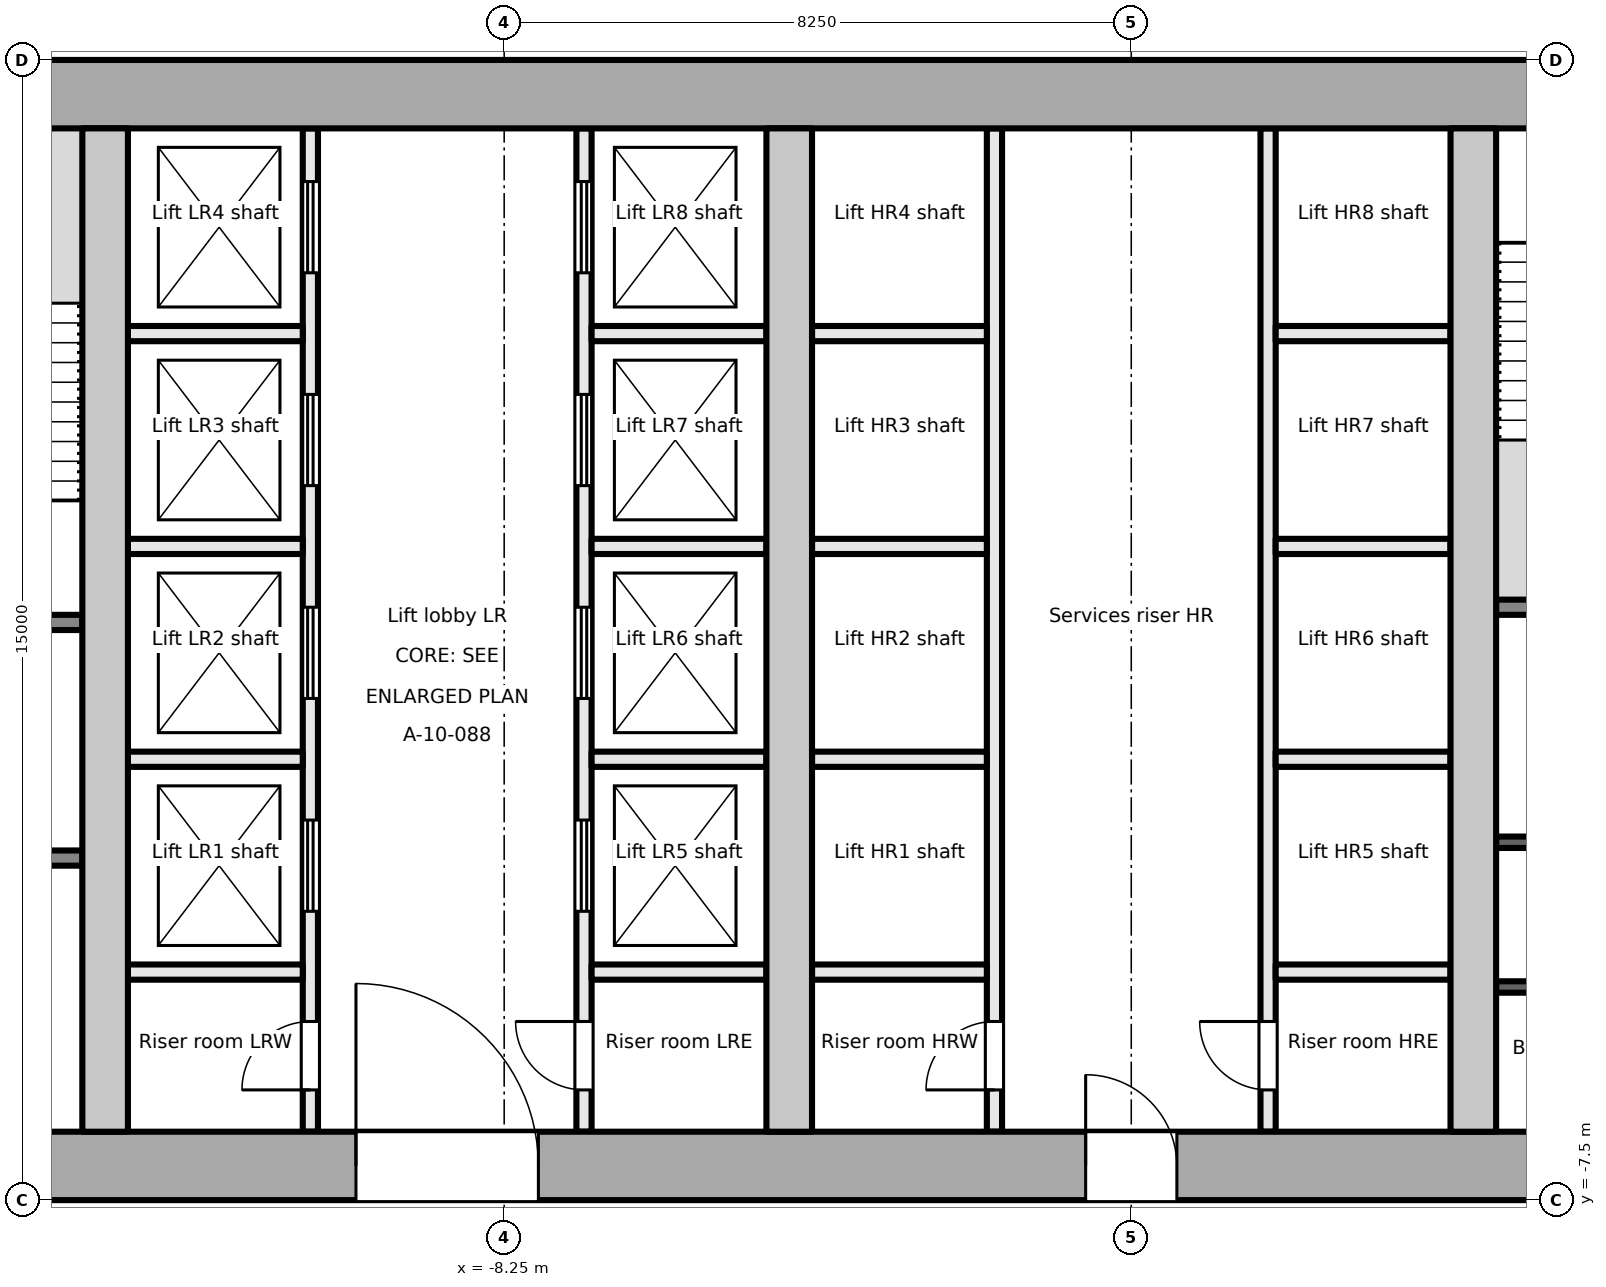
"""IFC4 building model, lengths in metres.
Left out: names, types, materials, properties, quantities, classifications, styles, units other than length and angle.
Written with IfcOpenShell. Run it as: python <this file> out.ifc"""

import sys

from ifc_helpers import new_model, si_unit, direction, frame, frame_2d, origin, place, context, subcontext, project, spatial, rectangle, extrude, element, fill, save


model = new_model("IFC4")
c1 = context("Model", 3, precision=1e-05, world=origin(), true_north=direction((0.0, 1.0)))
c2 = subcontext(c1, "Body", "Model", "MODEL_VIEW")
j1 = project(units=[si_unit("LENGTHUNIT", "METRE"), si_unit("PLANEANGLEUNIT", "RADIAN")], contexts=[c1])
p1 = place(None, origin())
s1 = spatial("IfcSite", under=j1, at=p1, CompositionType="ELEMENT")
p2 = place(p1, origin())
s2 = spatial("IfcBuilding", under=s1, at=p2, CompositionType="ELEMENT")
p3 = place(p2, frame((0.0, 0.0, 44.7)))
s3 = spatial("IfcBuildingStorey", under=s2, at=p3, CompositionType="ELEMENT", Elevation=44.7)
p4 = place(p3, frame((-18.0, -7.05, -0.2), z_axis=(0.0, 0.0, 1.0), x_axis=(1.0, 0.0, 0.0)))
e1 = element("IfcWall", 1, at=p4, inside=s3, PredefinedType="SHEAR", context=c2, shape_type="SweptSolid", body=[
    extrude(rectangle(XDim=36.0, YDim=0.9, at=frame_2d((18.0, 0.0))), origin(), (0.0, 0.0, 1.0), 4.1),
])
p5 = place(p4, frame((7.8, 0.0, 0.2)))
e2 = element("IfcOpeningElement", 2, at=p5, cuts=e1, PredefinedType="OPENING", context=c2, shape_type="SweptSolid", body=[
    extrude(rectangle(XDim=2.4, YDim=2.1, at=frame_2d((1.2, 1.05))), frame((0.0, 0.46, 0.0), z_axis=(0.0, -1.0, 0.0), x_axis=(1.0, 0.0, 0.0)), (0.0, 0.0, 1.0), 0.921),
])
p6 = place(p4, frame((17.4, 0.0, 0.2)))
e3 = element("IfcOpeningElement", 3, at=p6, cuts=e1, PredefinedType="OPENING", context=c2, shape_type="SweptSolid", body=[
    extrude(rectangle(XDim=1.2, YDim=2.1, at=frame_2d((0.6, 1.05))), frame((0.0, 0.46, 0.0), z_axis=(0.0, -1.0, 0.0), x_axis=(1.0, 0.0, 0.0)), (0.0, 0.0, 1.0), 0.921),
])
p7 = place(p4, frame((26.1, 0.0, 0.2)))
e4 = element("IfcOpeningElement", 4, at=p7, cuts=e1, PredefinedType="OPENING", context=c2, shape_type="SweptSolid", body=[
    extrude(rectangle(XDim=2.4, YDim=2.1, at=frame_2d((1.2, 1.05))), frame((0.0, 0.46, 0.0), z_axis=(0.0, -1.0, 0.0), x_axis=(1.0, 0.0, 0.0)), (0.0, 0.0, 1.0), 0.921),
])
p8 = place(p3, frame((-18.0, 7.05, -0.2), z_axis=(0.0, 0.0, 1.0), x_axis=(1.0, 0.0, 0.0)))
e5 = element("IfcWall", 5, at=p8, inside=s3, PredefinedType="SHEAR", context=c2, shape_type="SweptSolid", body=[
    extrude(rectangle(XDim=36.0, YDim=0.9, at=frame_2d((18.0, 0.0))), origin(), (0.0, 0.0, 1.0), 4.1),
])
for number, where, z_axis, x_axis in (
    (6, (-13.5, -6.6, -0.2), (0.0, 0.0, 1.0), (0.0, 1.0, 0.0)),
    (7, (-4.5, -6.6, -0.2), (0.0, 0.0, 1.0), (0.0, 1.0, 0.0)),
    (8, (4.5, -6.6, -0.2), (0.0, 0.0, 1.0), (0.0, 1.0, 0.0)),
):
    element("IfcWall", number, at=place(p3, frame(where, z_axis=z_axis, x_axis=x_axis)), inside=s3, PredefinedType="SHEAR", context=c2, shape_type="SweptSolid", body=[
        extrude(rectangle(XDim=13.2, YDim=0.6, at=frame_2d((6.6, 0.0))), origin(), (0.0, 0.0, 1.0), 4.1),
    ])
p9 = place(p3, frame((-17.1, -3.0, 0.0), z_axis=(0.0, 0.0, 1.0), x_axis=(1.0, 0.0, 0.0)))
e9 = element("IfcWall", 9, at=p9, inside=s3, PredefinedType="PARTITIONING", context=c2, shape_type="SweptSolid", body=[
    extrude(rectangle(XDim=3.3, YDim=0.2, at=frame_2d((1.65, 0.0))), origin(), (0.0, 0.0, 1.0), 3.9),
])
p10 = place(p9, frame((1.1, 0.0, 0.0)))
e10 = element("IfcOpeningElement", 10, at=p10, cuts=e9, PredefinedType="OPENING", context=c2, shape_type="SweptSolid", body=[
    extrude(rectangle(XDim=1.1, YDim=2.1, at=frame_2d((0.55, 1.05))), frame((0.0, 0.111, 0.0), z_axis=(0.0, -1.0, 0.0), x_axis=(1.0, 0.0, 0.0)), (0.0, 0.0, 1.0), 0.221),
])
p11 = place(p3, frame((-17.1, 0.1, 0.0), z_axis=(0.0, 0.0, 1.0), x_axis=(1.0, 0.0, 0.0)))
e11 = element("IfcWall", 11, at=p11, inside=s3, PredefinedType="PARTITIONING", context=c2, shape_type="SweptSolid", body=[
    extrude(rectangle(XDim=3.3, YDim=0.2, at=frame_2d((1.65, 0.0))), origin(), (0.0, 0.0, 1.0), 3.9),
])
p12 = place(p11, frame((1.1, 0.0, 0.0)))
e12 = element("IfcOpeningElement", 12, at=p12, cuts=e11, PredefinedType="OPENING", context=c2, shape_type="SweptSolid", body=[
    extrude(rectangle(XDim=1.1, YDim=2.1, at=frame_2d((0.55, 1.05))), frame((0.0, 0.111, 0.0), z_axis=(0.0, -1.0, 0.0), x_axis=(1.0, 0.0, 0.0)), (0.0, 0.0, 1.0), 0.221),
])
p13 = place(p3, frame((-10.8, -6.6, 0.0), z_axis=(0.0, 0.0, 1.0), x_axis=(0.0, 1.0, 0.0)))
e13 = element("IfcWall", 13, at=p13, inside=s3, PredefinedType="PARTITIONING", context=c2, shape_type="SweptSolid", body=[
    extrude(rectangle(XDim=13.2, YDim=0.2, at=frame_2d((6.6, 0.0))), origin(), (0.0, 0.0, 1.0), 3.9),
])
p14 = place(p13, frame((0.55, 0.0, 0.0)))
e14 = element("IfcOpeningElement", 14, at=p14, cuts=e13, PredefinedType="OPENING", context=c2, shape_type="SweptSolid", body=[
    extrude(rectangle(XDim=0.9, YDim=2.1, at=frame_2d((0.45, 1.05))), frame((0.0, 0.111, 0.0), z_axis=(0.0, -1.0, 0.0), x_axis=(1.0, 0.0, 0.0)), (0.0, 0.0, 1.0), 0.221),
])
p15 = place(p13, frame((2.9, 0.0, 0.0)))
e15 = element("IfcOpeningElement", 15, at=p15, cuts=e13, PredefinedType="OPENING", context=c2, shape_type="SweptSolid", body=[
    extrude(rectangle(XDim=1.2, YDim=2.1, at=frame_2d((0.6, 1.05))), frame((0.0, 0.111, 0.0), z_axis=(0.0, -1.0, 0.0), x_axis=(1.0, 0.0, 0.0)), (0.0, 0.0, 1.0), 0.221),
])
p16 = place(p13, frame((5.7, 0.0, 0.0)))
e16 = element("IfcOpeningElement", 16, at=p16, cuts=e13, PredefinedType="OPENING", context=c2, shape_type="SweptSolid", body=[
    extrude(rectangle(XDim=1.2, YDim=2.1, at=frame_2d((0.6, 1.05))), frame((0.0, 0.111, 0.0), z_axis=(0.0, -1.0, 0.0), x_axis=(1.0, 0.0, 0.0)), (0.0, 0.0, 1.0), 0.221),
])
p17 = place(p13, frame((8.5, 0.0, 0.0)))
e17 = element("IfcOpeningElement", 17, at=p17, cuts=e13, PredefinedType="OPENING", context=c2, shape_type="SweptSolid", body=[
    extrude(rectangle(XDim=1.2, YDim=2.1, at=frame_2d((0.6, 1.05))), frame((0.0, 0.111, 0.0), z_axis=(0.0, -1.0, 0.0), x_axis=(1.0, 0.0, 0.0)), (0.0, 0.0, 1.0), 0.221),
])
p18 = place(p13, frame((11.3, 0.0, 0.0)))
e18 = element("IfcOpeningElement", 18, at=p18, cuts=e13, PredefinedType="OPENING", context=c2, shape_type="SweptSolid", body=[
    extrude(rectangle(XDim=1.2, YDim=2.1, at=frame_2d((0.6, 1.05))), frame((0.0, 0.111, 0.0), z_axis=(0.0, -1.0, 0.0), x_axis=(1.0, 0.0, 0.0)), (0.0, 0.0, 1.0), 0.221),
])
p19 = place(p3, frame((-7.2, -6.6, 0.0), z_axis=(0.0, 0.0, 1.0), x_axis=(0.0, 1.0, 0.0)))
e19 = element("IfcWall", 19, at=p19, inside=s3, PredefinedType="PARTITIONING", context=c2, shape_type="SweptSolid", body=[
    extrude(rectangle(XDim=13.2, YDim=0.2, at=frame_2d((6.6, 0.0))), origin(), (0.0, 0.0, 1.0), 3.9),
])
p20 = place(p19, frame((0.55, 0.0, 0.0)))
e20 = element("IfcOpeningElement", 20, at=p20, cuts=e19, PredefinedType="OPENING", context=c2, shape_type="SweptSolid", body=[
    extrude(rectangle(XDim=0.9, YDim=2.1, at=frame_2d((0.45, 1.05))), frame((0.0, 0.111, 0.0), z_axis=(0.0, -1.0, 0.0), x_axis=(1.0, 0.0, 0.0)), (0.0, 0.0, 1.0), 0.221),
])
p21 = place(p19, frame((2.9, 0.0, 0.0)))
e21 = element("IfcOpeningElement", 21, at=p21, cuts=e19, PredefinedType="OPENING", context=c2, shape_type="SweptSolid", body=[
    extrude(rectangle(XDim=1.2, YDim=2.1, at=frame_2d((0.6, 1.05))), frame((0.0, 0.111, 0.0), z_axis=(0.0, -1.0, 0.0), x_axis=(1.0, 0.0, 0.0)), (0.0, 0.0, 1.0), 0.221),
])
p22 = place(p19, frame((5.7, 0.0, 0.0)))
e22 = element("IfcOpeningElement", 22, at=p22, cuts=e19, PredefinedType="OPENING", context=c2, shape_type="SweptSolid", body=[
    extrude(rectangle(XDim=1.2, YDim=2.1, at=frame_2d((0.6, 1.05))), frame((0.0, 0.111, 0.0), z_axis=(0.0, -1.0, 0.0), x_axis=(1.0, 0.0, 0.0)), (0.0, 0.0, 1.0), 0.221),
])
p23 = place(p19, frame((8.5, 0.0, 0.0)))
e23 = element("IfcOpeningElement", 23, at=p23, cuts=e19, PredefinedType="OPENING", context=c2, shape_type="SweptSolid", body=[
    extrude(rectangle(XDim=1.2, YDim=2.1, at=frame_2d((0.6, 1.05))), frame((0.0, 0.111, 0.0), z_axis=(0.0, -1.0, 0.0), x_axis=(1.0, 0.0, 0.0)), (0.0, 0.0, 1.0), 0.221),
])
p24 = place(p19, frame((11.3, 0.0, 0.0)))
e24 = element("IfcOpeningElement", 24, at=p24, cuts=e19, PredefinedType="OPENING", context=c2, shape_type="SweptSolid", body=[
    extrude(rectangle(XDim=1.2, YDim=2.1, at=frame_2d((0.6, 1.05))), frame((0.0, 0.111, 0.0), z_axis=(0.0, -1.0, 0.0), x_axis=(1.0, 0.0, 0.0)), (0.0, 0.0, 1.0), 0.221),
])
for number, where, z_axis, x_axis in (
    (25, (-13.2, -1.7, 0.0), (0.0, 0.0, 1.0), (1.0, 0.0, 0.0)),
    (26, (-13.2, 1.1, 0.0), (0.0, 0.0, 1.0), (1.0, 0.0, 0.0)),
    (27, (-13.2, 3.9, 0.0), (0.0, 0.0, 1.0), (1.0, 0.0, 0.0)),
    (28, (-13.2, -4.5, 0.0), (0.0, 0.0, 1.0), (1.0, 0.0, 0.0)),
    (29, (-7.1, -1.7, 0.0), (0.0, 0.0, 1.0), (1.0, 0.0, 0.0)),
    (30, (-7.1, 1.1, 0.0), (0.0, 0.0, 1.0), (1.0, 0.0, 0.0)),
    (31, (-7.1, 3.9, 0.0), (0.0, 0.0, 1.0), (1.0, 0.0, 0.0)),
    (32, (-7.1, -4.5, 0.0), (0.0, 0.0, 1.0), (1.0, 0.0, 0.0)),
):
    element("IfcWall", number, at=place(p3, frame(where, z_axis=z_axis, x_axis=x_axis)), inside=s3, PredefinedType="PARTITIONING", context=c2, shape_type="SweptSolid", body=[
        extrude(rectangle(XDim=2.3, YDim=0.2, at=frame_2d((1.15, 0.0))), origin(), (0.0, 0.0, 1.0), 3.9),
    ])
p25 = place(p3, frame((-1.8, -6.6, 0.0), z_axis=(0.0, 0.0, 1.0), x_axis=(0.0, 1.0, 0.0)))
e33 = element("IfcWall", 33, at=p25, inside=s3, PredefinedType="PARTITIONING", context=c2, shape_type="SweptSolid", body=[
    extrude(rectangle(XDim=13.2, YDim=0.2, at=frame_2d((6.6, 0.0))), origin(), (0.0, 0.0, 1.0), 3.9),
])
p26 = place(p25, frame((0.55, 0.0, 0.0)))
e34 = element("IfcOpeningElement", 34, at=p26, cuts=e33, PredefinedType="OPENING", context=c2, shape_type="SweptSolid", body=[
    extrude(rectangle(XDim=0.9, YDim=2.1, at=frame_2d((0.45, 1.05))), frame((0.0, 0.111, 0.0), z_axis=(0.0, -1.0, 0.0), x_axis=(1.0, 0.0, 0.0)), (0.0, 0.0, 1.0), 0.221),
])
p27 = place(p3, frame((1.8, -6.6, 0.0), z_axis=(0.0, 0.0, 1.0), x_axis=(0.0, 1.0, 0.0)))
e35 = element("IfcWall", 35, at=p27, inside=s3, PredefinedType="PARTITIONING", context=c2, shape_type="SweptSolid", body=[
    extrude(rectangle(XDim=13.2, YDim=0.2, at=frame_2d((6.6, 0.0))), origin(), (0.0, 0.0, 1.0), 3.9),
])
p28 = place(p27, frame((0.55, 0.0, 0.0)))
e36 = element("IfcOpeningElement", 36, at=p28, cuts=e35, PredefinedType="OPENING", context=c2, shape_type="SweptSolid", body=[
    extrude(rectangle(XDim=0.9, YDim=2.1, at=frame_2d((0.45, 1.05))), frame((0.0, 0.111, 0.0), z_axis=(0.0, -1.0, 0.0), x_axis=(1.0, 0.0, 0.0)), (0.0, 0.0, 1.0), 0.221),
])
for number, where, z_axis, x_axis in (
    (37, (-4.2, -1.7, 0.0), (0.0, 0.0, 1.0), (1.0, 0.0, 0.0)),
    (38, (-4.2, 1.1, 0.0), (0.0, 0.0, 1.0), (1.0, 0.0, 0.0)),
    (39, (-4.2, 3.9, 0.0), (0.0, 0.0, 1.0), (1.0, 0.0, 0.0)),
    (40, (-4.2, -4.5, 0.0), (0.0, 0.0, 1.0), (1.0, 0.0, 0.0)),
    (41, (1.9, -1.7, 0.0), (0.0, 0.0, 1.0), (1.0, 0.0, 0.0)),
    (42, (1.9, 1.1, 0.0), (0.0, 0.0, 1.0), (1.0, 0.0, 0.0)),
    (43, (1.9, 3.9, 0.0), (0.0, 0.0, 1.0), (1.0, 0.0, 0.0)),
    (44, (1.9, -4.5, 0.0), (0.0, 0.0, 1.0), (1.0, 0.0, 0.0)),
):
    element("IfcWall", number, at=place(p3, frame(where, z_axis=z_axis, x_axis=x_axis)), inside=s3, PredefinedType="PARTITIONING", context=c2, shape_type="SweptSolid", body=[
        extrude(rectangle(XDim=2.3, YDim=0.2, at=frame_2d((1.15, 0.0))), origin(), (0.0, 0.0, 1.0), 3.9),
    ])
p29 = place(p3, frame((4.8, 0.3, 0.0), z_axis=(0.0, 0.0, 1.0), x_axis=(1.0, 0.0, 0.0)))
e45 = element("IfcWall", 45, at=p29, inside=s3, PredefinedType="PARTITIONING", context=c2, shape_type="SweptSolid", body=[
    extrude(rectangle(XDim=3.15, YDim=0.2, at=frame_2d((1.575, 0.0))), origin(), (0.0, 0.0, 1.0), 3.9),
])
for number, where, z_axis, x_axis in (
    (46, (4.8, -4.696, 0.0), (0.0, 0.0, 1.0), (1.0, 0.0, 0.0)),
    (47, (4.8, -2.792, 0.0), (0.0, 0.0, 1.0), (1.0, 0.0, 0.0)),
):
    element("IfcWall", number, at=place(p3, frame(where, z_axis=z_axis, x_axis=x_axis)), inside=s3, PredefinedType="PARTITIONING", context=c2, shape_type="SweptSolid", body=[
        extrude(rectangle(XDim=3.15, YDim=0.15, at=frame_2d((1.575, 0.0))), origin(), (0.0, 0.0, 1.0), 3.9),
    ])
p30 = place(p14, origin())
e48 = element("IfcDoor", 48, at=p30, inside=s3, OperationType="SINGLE_SWING_LEFT", PredefinedType="DOOR", context=c2, shape_type="SweptSolid", body=[
    extrude(rectangle(XDim=0.9, YDim=2.1, at=frame_2d((0.45, 1.05))), frame((0.0, 0.025, 0.0), z_axis=(0.0, -1.0, 0.0), x_axis=(1.0, 0.0, 0.0)), (0.0, 0.0, 1.0), 0.05),
])
fill(e14, e48)
p31 = place(p15, origin())
e49 = element("IfcDoor", 49, at=p31, inside=s3, OperationType="DOUBLE_DOOR_SLIDING", PredefinedType="DOOR", context=c2, shape_type="SweptSolid", body=[
    extrude(rectangle(XDim=1.2, YDim=2.1, at=frame_2d((0.6, 1.05))), frame((0.0, 0.025, 0.0), z_axis=(0.0, -1.0, 0.0), x_axis=(1.0, 0.0, 0.0)), (0.0, 0.0, 1.0), 0.05),
])
fill(e15, e49)
p32 = place(p16, origin())
e50 = element("IfcDoor", 50, at=p32, inside=s3, OperationType="DOUBLE_DOOR_SLIDING", PredefinedType="DOOR", context=c2, shape_type="SweptSolid", body=[
    extrude(rectangle(XDim=1.2, YDim=2.1, at=frame_2d((0.6, 1.05))), frame((0.0, 0.025, 0.0), z_axis=(0.0, -1.0, 0.0), x_axis=(1.0, 0.0, 0.0)), (0.0, 0.0, 1.0), 0.05),
])
fill(e16, e50)
p33 = place(p17, origin())
e51 = element("IfcDoor", 51, at=p33, inside=s3, OperationType="DOUBLE_DOOR_SLIDING", PredefinedType="DOOR", context=c2, shape_type="SweptSolid", body=[
    extrude(rectangle(XDim=1.2, YDim=2.1, at=frame_2d((0.6, 1.05))), frame((0.0, 0.025, 0.0), z_axis=(0.0, -1.0, 0.0), x_axis=(1.0, 0.0, 0.0)), (0.0, 0.0, 1.0), 0.05),
])
fill(e17, e51)
p34 = place(p18, origin())
e52 = element("IfcDoor", 52, at=p34, inside=s3, OperationType="DOUBLE_DOOR_SLIDING", PredefinedType="DOOR", context=c2, shape_type="SweptSolid", body=[
    extrude(rectangle(XDim=1.2, YDim=2.1, at=frame_2d((0.6, 1.05))), frame((0.0, 0.025, 0.0), z_axis=(0.0, -1.0, 0.0), x_axis=(1.0, 0.0, 0.0)), (0.0, 0.0, 1.0), 0.05),
])
fill(e18, e52)
p35 = place(p20, origin())
e53 = element("IfcDoor", 53, at=p35, inside=s3, OperationType="SINGLE_SWING_RIGHT", PredefinedType="DOOR", context=c2, shape_type="SweptSolid", body=[
    extrude(rectangle(XDim=0.9, YDim=2.1, at=frame_2d((0.45, 1.05))), frame((0.0, 0.025, 0.0), z_axis=(0.0, -1.0, 0.0), x_axis=(1.0, 0.0, 0.0)), (0.0, 0.0, 1.0), 0.05),
])
fill(e20, e53)
p36 = place(p21, origin())
e54 = element("IfcDoor", 54, at=p36, inside=s3, OperationType="DOUBLE_DOOR_SLIDING", PredefinedType="DOOR", context=c2, shape_type="SweptSolid", body=[
    extrude(rectangle(XDim=1.2, YDim=2.1, at=frame_2d((0.6, 1.05))), frame((0.0, 0.025, 0.0), z_axis=(0.0, -1.0, 0.0), x_axis=(1.0, 0.0, 0.0)), (0.0, 0.0, 1.0), 0.05),
])
fill(e21, e54)
p37 = place(p22, origin())
e55 = element("IfcDoor", 55, at=p37, inside=s3, OperationType="DOUBLE_DOOR_SLIDING", PredefinedType="DOOR", context=c2, shape_type="SweptSolid", body=[
    extrude(rectangle(XDim=1.2, YDim=2.1, at=frame_2d((0.6, 1.05))), frame((0.0, 0.025, 0.0), z_axis=(0.0, -1.0, 0.0), x_axis=(1.0, 0.0, 0.0)), (0.0, 0.0, 1.0), 0.05),
])
fill(e22, e55)
p38 = place(p23, origin())
e56 = element("IfcDoor", 56, at=p38, inside=s3, OperationType="DOUBLE_DOOR_SLIDING", PredefinedType="DOOR", context=c2, shape_type="SweptSolid", body=[
    extrude(rectangle(XDim=1.2, YDim=2.1, at=frame_2d((0.6, 1.05))), frame((0.0, 0.025, 0.0), z_axis=(0.0, -1.0, 0.0), x_axis=(1.0, 0.0, 0.0)), (0.0, 0.0, 1.0), 0.05),
])
fill(e23, e56)
p39 = place(p24, origin())
e57 = element("IfcDoor", 57, at=p39, inside=s3, OperationType="DOUBLE_DOOR_SLIDING", PredefinedType="DOOR", context=c2, shape_type="SweptSolid", body=[
    extrude(rectangle(XDim=1.2, YDim=2.1, at=frame_2d((0.6, 1.05))), frame((0.0, 0.025, 0.0), z_axis=(0.0, -1.0, 0.0), x_axis=(1.0, 0.0, 0.0)), (0.0, 0.0, 1.0), 0.05),
])
fill(e24, e57)
p40 = place(p5, origin())
e58 = element("IfcDoor", 58, at=p40, inside=s3, OperationType="DOUBLE_DOOR_DOUBLE_SWING", PredefinedType="DOOR", context=c2, shape_type="SweptSolid", body=[
    extrude(rectangle(XDim=2.4, YDim=2.1, at=frame_2d((1.2, 1.05))), frame((0.0, 0.025, 0.0), z_axis=(0.0, -1.0, 0.0), x_axis=(1.0, 0.0, 0.0)), (0.0, 0.0, 1.0), 0.05),
])
fill(e2, e58)
p41 = place(p26, origin())
e59 = element("IfcDoor", 59, at=p41, inside=s3, OperationType="SINGLE_SWING_LEFT", PredefinedType="DOOR", context=c2, shape_type="SweptSolid", body=[
    extrude(rectangle(XDim=0.9, YDim=2.1, at=frame_2d((0.45, 1.05))), frame((0.0, 0.025, 0.0), z_axis=(0.0, -1.0, 0.0), x_axis=(1.0, 0.0, 0.0)), (0.0, 0.0, 1.0), 0.05),
])
fill(e34, e59)
p42 = place(p28, origin())
e60 = element("IfcDoor", 60, at=p42, inside=s3, OperationType="SINGLE_SWING_RIGHT", PredefinedType="DOOR", context=c2, shape_type="SweptSolid", body=[
    extrude(rectangle(XDim=0.9, YDim=2.1, at=frame_2d((0.45, 1.05))), frame((0.0, 0.025, 0.0), z_axis=(0.0, -1.0, 0.0), x_axis=(1.0, 0.0, 0.0)), (0.0, 0.0, 1.0), 0.05),
])
fill(e36, e60)
p43 = place(p6, origin())
e61 = element("IfcDoor", 61, at=p43, inside=s3, OperationType="SINGLE_SWING_LEFT", PredefinedType="DOOR", context=c2, shape_type="SweptSolid", body=[
    extrude(rectangle(XDim=1.2, YDim=2.1, at=frame_2d((0.6, 1.05))), frame((0.0, 0.025, 0.0), z_axis=(0.0, -1.0, 0.0), x_axis=(1.0, 0.0, 0.0)), (0.0, 0.0, 1.0), 0.05),
])
fill(e3, e61)
save(model, sys.argv[1])
